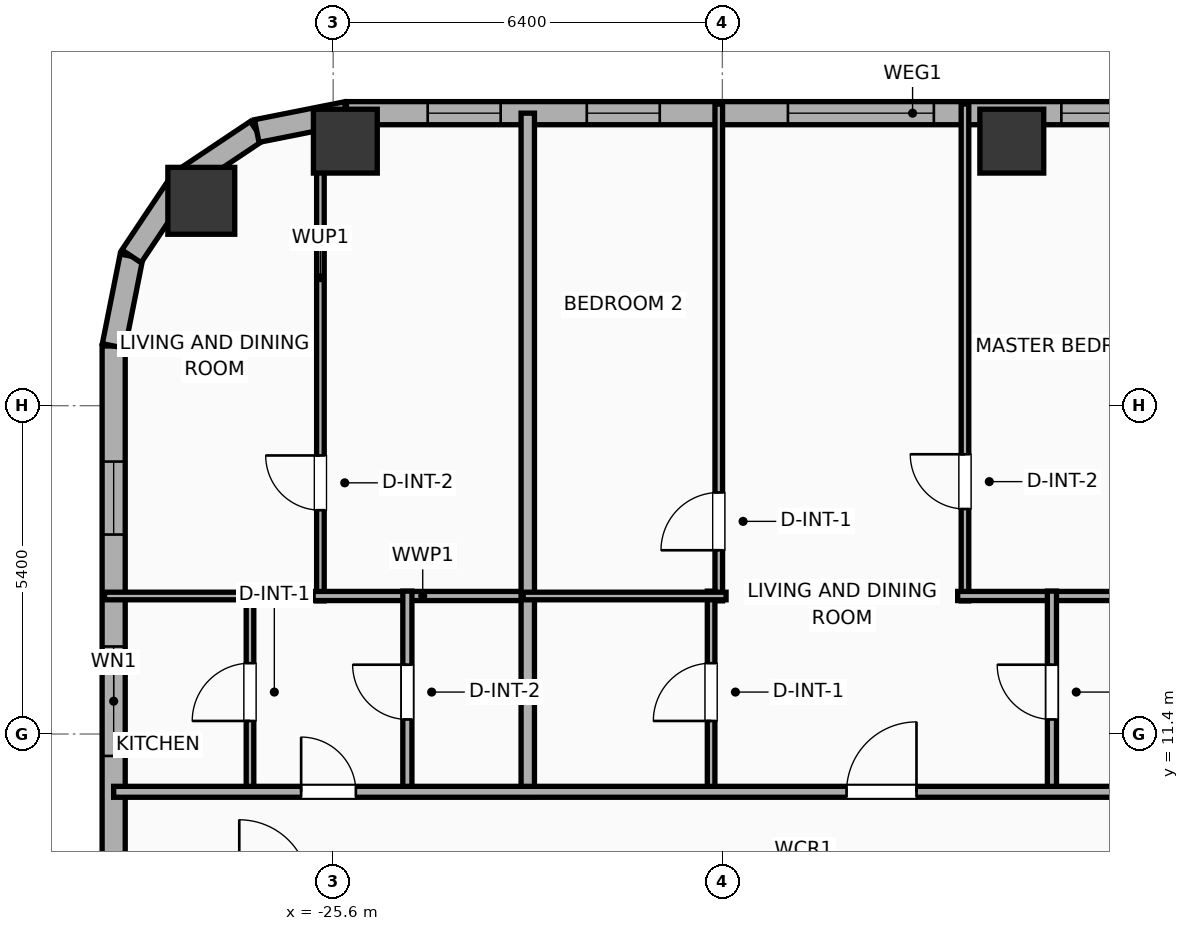
"""IFC4 building model, lengths in metres.
Left out: names, types, materials, properties, quantities, classifications, styles, units other than length and angle.
Written with IfcOpenShell. Run it as: python <this file> out.ifc"""

import sys

from ifc_helpers import new_model, si_unit, direction, frame, frame_2d, origin, origin_2d, place, context, subcontext, project, spatial, rectangle, hollow_rectangle, hollow_circle, extrude, element, fill, save


model = new_model("IFC4")
c1 = context("Model", 3, precision=1e-05, world=origin(), true_north=direction((0.0, 1.0)))
c2 = subcontext(c1, "Body", "Model", "MODEL_VIEW")
j1 = project(units=[si_unit("LENGTHUNIT", "METRE"), si_unit("PLANEANGLEUNIT", "RADIAN")], contexts=[c1])
p1 = place(None, origin())
s1 = spatial("IfcSite", under=j1, at=p1, CompositionType="ELEMENT")
p2 = place(p1, origin())
s2 = spatial("IfcBuilding", under=s1, at=p2, CompositionType="ELEMENT")
p3 = place(p2, frame((0.0, 0.0, 117.0)))
s3 = spatial("IfcBuildingStorey", under=s2, at=p3, CompositionType="ELEMENT", Elevation=117.0)
for number, where, z_axis, x_axis in (
    (1, (-14.44, 21.15, 0.0), (0.0, 0.0, 1.0), (1.0, 0.0, 0.0)),
    (2, (-25.4, 21.15, 0.0), (0.0, 0.0, 1.0), (1.0, 0.0, 0.0)),
):
    element("IfcColumn", number, at=place(p3, frame(where, z_axis=z_axis, x_axis=x_axis)), inside=s3, PredefinedType="COLUMN", context=c2, shape_type="SweptSolid", body=[
        extrude(hollow_rectangle(XDim=1.05, YDim=1.05, WallThickness=0.036, at=origin_2d()), origin(), (0.0, 0.0, 1.0), 3.9),
    ])
p4 = place(p3, frame((-27.769, 20.169, 0.0), z_axis=(0.0, 0.0, 1.0), x_axis=(1.0, 0.0, 0.0)))
e3 = element("IfcColumn", 3, at=p4, inside=s3, PredefinedType="COLUMN", context=c2, shape_type="SweptSolid", body=[
    extrude(hollow_circle(Radius=0.55, WallThickness=0.036, at=origin_2d()), origin(), (0.0, 0.0, 1.0), 3.9),
])
p5 = place(p3, frame((-29.21, 6.098, 0.0), z_axis=(0.0, 0.0, 1.0), x_axis=(0.0, 1.0, 0.0)))
e4 = element("IfcWall", 4, at=p5, inside=s3, PredefinedType="ELEMENTEDWALL", context=c2, shape_type="SweptSolid", body=[
    extrude(rectangle(XDim=11.683, YDim=0.38, at=frame_2d((5.842, 0.0))), origin(), (0.0, 0.0, 1.0), 3.65),
])
p6 = place(p5, frame((4.942, 0.0, 0.75)))
e5 = element("IfcOpeningElement", 5, at=p6, cuts=e4, PredefinedType="OPENING", context=c2, shape_type="SweptSolid", body=[
    extrude(rectangle(XDim=1.8, YDim=2.1, at=frame_2d((0.9, 1.05))), frame((0.0, 0.2, 0.0), z_axis=(0.0, -1.0, 0.0), x_axis=(1.0, 0.0, 0.0)), (0.0, 0.0, 1.0), 0.4),
])
p7 = place(p5, frame((8.583, 0.0, 0.75)))
e6 = element("IfcOpeningElement", 6, at=p7, cuts=e4, PredefinedType="OPENING", context=c2, shape_type="SweptSolid", body=[
    extrude(rectangle(XDim=1.2, YDim=2.05, at=frame_2d((0.6, 1.025))), frame((0.0, 0.2, 0.0), z_axis=(0.0, -1.0, 0.0), x_axis=(1.0, 0.0, 0.0)), (0.0, 0.0, 1.0), 0.4),
])
p8 = place(p3, frame((-29.21, 17.781, 0.0), z_axis=(0.0, 0.0, 1.0), x_axis=(0.195086038585, 0.980786132421, 0.0)))
e7 = element("IfcWall", 7, at=p8, inside=s3, PredefinedType="ELEMENTEDWALL", context=c2, shape_type="SweptSolid", body=[
    extrude(rectangle(XDim=1.504, YDim=0.38, at=frame_2d((0.752, 0.0))), origin(), (0.0, 0.0, 1.0), 3.65),
])
p9 = place(p3, frame((-28.917, 19.257, 0.0), z_axis=(0.0, 0.0, 1.0), x_axis=(0.555610286119, 0.831442848281, 0.0)))
e8 = element("IfcWall", 8, at=p9, inside=s3, PredefinedType="ELEMENTEDWALL", context=c2, shape_type="SweptSolid", body=[
    extrude(rectangle(XDim=1.485, YDim=0.38, at=frame_2d((0.743, 0.0))), origin(), (0.0, 0.0, 1.0), 3.65),
])
p10 = place(p3, frame((-28.091, 20.491, 0.0), z_axis=(0.0, 0.0, 1.0), x_axis=(0.831468045563, 0.555572577804, 0.0)))
e9 = element("IfcWall", 9, at=p10, inside=s3, PredefinedType="ELEMENTEDWALL", context=c2, shape_type="SweptSolid", body=[
    extrude(rectangle(XDim=1.485, YDim=0.38, at=frame_2d((0.742, 0.0))), origin(), (0.0, 0.0, 1.0), 3.65),
])
p11 = place(p3, frame((-26.857, 21.316, 0.0), z_axis=(0.0, 0.0, 1.0), x_axis=(0.980755066645, 0.195242155415, 0.0)))
e10 = element("IfcWall", 10, at=p11, inside=s3, PredefinedType="ELEMENTEDWALL", context=c2, shape_type="SweptSolid", body=[
    extrude(rectangle(XDim=1.504, YDim=0.38, at=frame_2d((0.752, 0.0))), origin(), (0.0, 0.0, 1.0), 3.65),
])
p12 = place(p3, frame((-25.381, 21.61, 0.0), z_axis=(0.0, 0.0, 1.0), x_axis=(1.0, 0.0, 0.0)))
e11 = element("IfcWall", 11, at=p12, inside=s3, PredefinedType="ELEMENTEDWALL", context=c2, shape_type="SweptSolid", body=[
    extrude(rectangle(XDim=18.619, YDim=0.38, at=frame_2d((9.31, 0.0))), origin(), (0.0, 0.0, 1.0), 3.65),
])
p13 = place(p12, frame((7.26, 0.0, 0.75)))
e12 = element("IfcOpeningElement", 12, at=p13, cuts=e11, PredefinedType="OPENING", context=c2, shape_type="SweptSolid", body=[
    extrude(rectangle(XDim=2.4, YDim=2.1, at=frame_2d((1.2, 1.05))), frame((0.0, 0.2, 0.0), z_axis=(0.0, -1.0, 0.0), x_axis=(1.0, 0.0, 0.0)), (0.0, 0.0, 1.0), 0.4),
])
p14 = place(p12, frame((1.336, 0.0, 0.75)))
e13 = element("IfcOpeningElement", 13, at=p14, cuts=e11, PredefinedType="OPENING", context=c2, shape_type="SweptSolid", body=[
    extrude(rectangle(XDim=1.2, YDim=2.05, at=frame_2d((0.6, 1.025))), frame((0.0, 0.2, 0.0), z_axis=(0.0, -1.0, 0.0), x_axis=(1.0, 0.0, 0.0)), (0.0, 0.0, 1.0), 0.4),
])
p15 = place(p12, frame((3.952, 0.0, 0.75)))
e14 = element("IfcOpeningElement", 14, at=p15, cuts=e11, PredefinedType="OPENING", context=c2, shape_type="SweptSolid", body=[
    extrude(rectangle(XDim=1.2, YDim=2.05, at=frame_2d((0.6, 1.025))), frame((0.0, 0.2, 0.0), z_axis=(0.0, -1.0, 0.0), x_axis=(1.0, 0.0, 0.0)), (0.0, 0.0, 1.0), 0.4),
])
p16 = place(p12, frame((11.756, 0.0, 0.75)))
e15 = element("IfcOpeningElement", 15, at=p16, cuts=e11, PredefinedType="OPENING", context=c2, shape_type="SweptSolid", body=[
    extrude(rectangle(XDim=1.2, YDim=2.05, at=frame_2d((0.6, 1.025))), frame((0.0, 0.2, 0.0), z_axis=(0.0, -1.0, 0.0), x_axis=(1.0, 0.0, 0.0)), (0.0, 0.0, 1.0), 0.4),
])
p17 = place(p12, frame((14.363, 0.0, 0.75)))
e16 = element("IfcOpeningElement", 16, at=p17, cuts=e11, PredefinedType="OPENING", context=c2, shape_type="SweptSolid", body=[
    extrude(rectangle(XDim=1.2, YDim=2.05, at=frame_2d((0.6, 1.025))), frame((0.0, 0.2, 0.0), z_axis=(0.0, -1.0, 0.0), x_axis=(1.0, 0.0, 0.0)), (0.0, 0.0, 1.0), 0.4),
])
p18 = place(p3, frame((-25.81, 13.59, 0.0), z_axis=(0.0, 0.0, 1.0), x_axis=(0.0, 1.0, 0.0)))
e17 = element("IfcWall", 17, at=p18, inside=s3, PredefinedType="PARTITIONING", context=c2, shape_type="SweptSolid", body=[
    extrude(rectangle(XDim=8.088, YDim=0.125, at=frame_2d((4.044, 0.0))), origin(), (0.0, 0.0, 1.0), 3.65),
])
p19 = place(p18, frame((1.491, 0.0, 0.0)))
e18 = element("IfcOpeningElement", 18, at=p19, cuts=e17, PredefinedType="OPENING", context=c2, shape_type="SweptSolid", body=[
    extrude(rectangle(XDim=0.9, YDim=2.05, at=frame_2d((0.45, 1.025))), frame((0.0, 0.073, 0.0), z_axis=(0.0, -1.0, 0.0), x_axis=(1.0, 0.0, 0.0)), (0.0, 0.0, 1.0), 0.145),
])
p20 = place(p3, frame((-25.93, 13.67, 0.0), z_axis=(0.0, 0.0, 1.0), x_axis=(1.0, 0.0, 0.0)))
e19 = element("IfcWall", 19, at=p20, inside=s3, PredefinedType="PLUMBINGWALL", context=c2, shape_type="SweptSolid", body=[
    extrude(rectangle(XDim=3.605, YDim=0.15, at=frame_2d((1.802, 0.0))), origin(), (0.0, 0.0, 1.0), 3.65),
])
p21 = place(p3, frame((-26.968, 10.43, 0.0), z_axis=(0.0, 0.0, 1.0), x_axis=(0.0, 1.0, 0.0)))
e20 = element("IfcWall", 20, at=p21, inside=s3, PredefinedType="PARTITIONING", context=c2, shape_type="SweptSolid", body=[
    extrude(rectangle(XDim=3.32, YDim=0.125, at=frame_2d((1.66, 0.0))), origin(), (0.0, 0.0, 1.0), 3.65),
])
p22 = place(p21, frame((1.185, 0.0, 0.0)))
e21 = element("IfcOpeningElement", 21, at=p22, cuts=e20, PredefinedType="OPENING", context=c2, shape_type="SweptSolid", body=[
    extrude(rectangle(XDim=0.95, YDim=2.05, at=frame_2d((0.475, 1.025))), frame((0.0, 0.073, 0.0), z_axis=(0.0, -1.0, 0.0), x_axis=(1.0, 0.0, 0.0)), (0.0, 0.0, 1.0), 0.145),
])
p23 = place(p3, frame((-29.36, 13.67, 0.0), z_axis=(0.0, 0.0, 1.0), x_axis=(1.0, 0.0, 0.0)))
e22 = element("IfcWall", 22, at=p23, inside=s3, PredefinedType="PARTITIONING", context=c2, shape_type="SweptSolid", body=[
    extrude(rectangle(XDim=2.512, YDim=0.125, at=frame_2d((1.256, 0.0))), origin(), (0.0, 0.0, 1.0), 3.65),
])
p24 = place(p3, frame((-24.38, 10.43, 0.0), z_axis=(0.0, 0.0, 1.0), x_axis=(0.0, 1.0, 0.0)))
e23 = element("IfcWall", 23, at=p24, inside=s3, PredefinedType="PLUMBINGWALL", context=c2, shape_type="SweptSolid", body=[
    extrude(rectangle(XDim=3.32, YDim=0.15, at=frame_2d((1.66, 0.0))), origin(), (0.0, 0.0, 1.0), 3.65),
])
p25 = place(p24, frame((1.21, 0.0, 0.0)))
e24 = element("IfcOpeningElement", 24, at=p25, cuts=e23, PredefinedType="OPENING", context=c2, shape_type="SweptSolid", body=[
    extrude(rectangle(XDim=0.9, YDim=2.05, at=frame_2d((0.45, 1.025))), frame((0.0, 0.085, 0.0), z_axis=(0.0, -1.0, 0.0), x_axis=(1.0, 0.0, 0.0)), (0.0, 0.0, 1.0), 0.17),
])
p26 = place(p3, frame((-22.4, 10.37, 0.0), z_axis=(0.0, 0.0, 1.0), x_axis=(0.0, 1.0, 0.0)))
e25 = element("IfcWall", 25, at=p26, inside=s3, PredefinedType="PARTITIONING", context=c2, shape_type="SweptSolid", body=[
    extrude(rectangle(XDim=11.24, YDim=0.22, at=frame_2d((5.62, 0.0))), origin(), (0.0, 0.0, 1.0), 3.65),
])
p27 = place(p3, frame((-19.259, 13.59, 0.0), z_axis=(0.0, 0.0, 1.0), x_axis=(0.0, 1.0, 0.0)))
e26 = element("IfcWall", 26, at=p27, inside=s3, PredefinedType="PARTITIONING", context=c2, shape_type="SweptSolid", body=[
    extrude(rectangle(XDim=8.17, YDim=0.125, at=frame_2d((4.085, 0.0))), origin(), (0.0, 0.0, 1.0), 3.65),
])
p28 = place(p27, frame((0.832, 0.0, 0.0)))
e27 = element("IfcOpeningElement", 27, at=p28, cuts=e26, PredefinedType="OPENING", context=c2, shape_type="SweptSolid", body=[
    extrude(rectangle(XDim=0.95, YDim=2.05, at=frame_2d((0.475, 1.025))), frame((0.0, 0.073, 0.0), z_axis=(0.0, -1.0, 0.0), x_axis=(1.0, 0.0, 0.0)), (0.0, 0.0, 1.0), 0.145),
])
p29 = place(p3, frame((-15.21, 13.59, 0.0), z_axis=(0.0, 0.0, 1.0), x_axis=(0.0, 1.0, 0.0)))
e28 = element("IfcWall", 28, at=p29, inside=s3, PredefinedType="PARTITIONING", context=c2, shape_type="SweptSolid", body=[
    extrude(rectangle(XDim=8.17, YDim=0.125, at=frame_2d((4.085, 0.0))), origin(), (0.0, 0.0, 1.0), 3.04),
])
p30 = place(p29, frame((1.511, 0.0, 0.0)))
e29 = element("IfcOpeningElement", 29, at=p30, cuts=e28, PredefinedType="OPENING", context=c2, shape_type="SweptSolid", body=[
    extrude(rectangle(XDim=0.9, YDim=2.05, at=frame_2d((0.45, 1.025))), frame((0.0, 0.073, 0.0), z_axis=(0.0, -1.0, 0.0), x_axis=(1.0, 0.0, 0.0)), (0.0, 0.0, 1.0), 0.145),
])
p31 = place(p3, frame((-15.33, 13.67, 0.0), z_axis=(0.0, 0.0, 1.0), x_axis=(1.0, 0.0, 0.0)))
e30 = element("IfcWall", 30, at=p31, inside=s3, PredefinedType="PLUMBINGWALL", context=c2, shape_type="SweptSolid", body=[
    extrude(rectangle(XDim=3.605, YDim=0.15, at=frame_2d((1.802, 0.0))), origin(), (0.0, 0.0, 1.0), 3.65),
])
p32 = place(p3, frame((-19.385, 10.43, 0.0), z_axis=(0.0, 0.0, 1.0), x_axis=(0.0, 1.0, 0.0)))
e31 = element("IfcWall", 31, at=p32, inside=s3, PredefinedType="PARTITIONING", context=c2, shape_type="SweptSolid", body=[
    extrude(rectangle(XDim=3.32, YDim=0.125, at=frame_2d((1.66, 0.0))), origin(), (0.0, 0.0, 1.0), 3.65),
])
p33 = place(p32, frame((1.185, 0.0, 0.0)))
e32 = element("IfcOpeningElement", 32, at=p33, cuts=e31, PredefinedType="OPENING", context=c2, shape_type="SweptSolid", body=[
    extrude(rectangle(XDim=0.95, YDim=2.05, at=frame_2d((0.475, 1.025))), frame((0.0, 0.073, 0.0), z_axis=(0.0, -1.0, 0.0), x_axis=(1.0, 0.0, 0.0)), (0.0, 0.0, 1.0), 0.145),
])
p34 = place(p3, frame((-22.475, 13.67, 0.0), z_axis=(0.0, 0.0, 1.0), x_axis=(1.0, 0.0, 0.0)))
e33 = element("IfcWall", 33, at=p34, inside=s3, PredefinedType="PARTITIONING", context=c2, shape_type="SweptSolid", body=[
    extrude(rectangle(XDim=3.336, YDim=0.125, at=frame_2d((1.668, 0.0))), origin(), (0.0, 0.0, 1.0), 3.65),
])
p35 = place(p3, frame((-13.78, 10.43, 0.0), z_axis=(0.0, 0.0, 1.0), x_axis=(0.0, 1.0, 0.0)))
e34 = element("IfcWall", 34, at=p35, inside=s3, PredefinedType="PLUMBINGWALL", context=c2, shape_type="SweptSolid", body=[
    extrude(rectangle(XDim=3.32, YDim=0.15, at=frame_2d((1.66, 0.0))), origin(), (0.0, 0.0, 1.0), 3.65),
])
p36 = place(p35, frame((1.21, 0.0, 0.0)))
e35 = element("IfcOpeningElement", 35, at=p36, cuts=e34, PredefinedType="OPENING", context=c2, shape_type="SweptSolid", body=[
    extrude(rectangle(XDim=0.9, YDim=2.05, at=frame_2d((0.45, 1.025))), frame((0.0, 0.085, 0.0), z_axis=(0.0, -1.0, 0.0), x_axis=(1.0, 0.0, 0.0)), (0.0, 0.0, 1.0), 0.17),
])
p37 = place(p3, frame((-29.21, 10.45, 0.0), z_axis=(0.0, 0.0, 1.0), x_axis=(1.0, 0.0, 0.0)))
e36 = element("IfcWall", 36, at=p37, inside=s3, PredefinedType="PARTITIONING", context=c2, shape_type="SweptSolid", body=[
    extrude(rectangle(XDim=62.42, YDim=0.18, at=frame_2d((31.21, 0.0))), origin(), (0.0, 0.0, 1.0), 3.65),
])
p38 = place(p37, frame((3.083, 0.0, 0.0)))
e37 = element("IfcOpeningElement", 37, at=p38, cuts=e36, PredefinedType="OPENING", context=c2, shape_type="SweptSolid", body=[
    extrude(rectangle(XDim=0.9, YDim=2.05, at=frame_2d((0.45, 1.025))), frame((0.0, 0.1, 0.0), z_axis=(0.0, -1.0, 0.0), x_axis=(1.0, 0.0, 0.0)), (0.0, 0.0, 1.0), 0.2),
])
p39 = place(p37, frame((12.052, 0.0, 0.0)))
e38 = element("IfcOpeningElement", 38, at=p39, cuts=e36, PredefinedType="OPENING", context=c2, shape_type="SweptSolid", body=[
    extrude(rectangle(XDim=1.15, YDim=2.05, at=frame_2d((0.575, 1.025))), frame((0.0, 0.1, 0.0), z_axis=(0.0, -1.0, 0.0), x_axis=(1.0, 0.0, 0.0)), (0.0, 0.0, 1.0), 0.2),
])
p40 = place(p37, frame((22.558, 0.0, 0.0)))
e39 = element("IfcOpeningElement", 39, at=p40, cuts=e36, PredefinedType="OPENING", context=c2, shape_type="SweptSolid", body=[
    extrude(rectangle(XDim=1.15, YDim=2.05, at=frame_2d((0.575, 1.025))), frame((0.0, 0.1, 0.0), z_axis=(0.0, -1.0, 0.0), x_axis=(1.0, 0.0, 0.0)), (0.0, 0.0, 1.0), 0.2),
])
p41 = place(p37, frame((33.219, 0.0, 0.0)))
e40 = element("IfcOpeningElement", 40, at=p41, cuts=e36, PredefinedType="OPENING", context=c2, shape_type="SweptSolid", body=[
    extrude(rectangle(XDim=1.15, YDim=2.05, at=frame_2d((0.575, 1.025))), frame((0.0, 0.1, 0.0), z_axis=(0.0, -1.0, 0.0), x_axis=(1.0, 0.0, 0.0)), (0.0, 0.0, 1.0), 0.2),
])
p42 = place(p37, frame((43.725, 0.0, 0.0)))
e41 = element("IfcOpeningElement", 41, at=p42, cuts=e36, PredefinedType="OPENING", context=c2, shape_type="SweptSolid", body=[
    extrude(rectangle(XDim=1.15, YDim=2.05, at=frame_2d((0.575, 1.025))), frame((0.0, 0.1, 0.0), z_axis=(0.0, -1.0, 0.0), x_axis=(1.0, 0.0, 0.0)), (0.0, 0.0, 1.0), 0.2),
])
p43 = place(p37, frame((52.232, 0.0, 0.0)))
e42 = element("IfcOpeningElement", 42, at=p43, cuts=e36, PredefinedType="OPENING", context=c2, shape_type="SweptSolid", body=[
    extrude(rectangle(XDim=0.9, YDim=2.05, at=frame_2d((0.45, 1.025))), frame((0.0, 0.1, 0.0), z_axis=(0.0, -1.0, 0.0), x_axis=(1.0, 0.0, 0.0)), (0.0, 0.0, 1.0), 0.2),
])
p44 = place(p37, frame((58.868, 0.0, 0.0)))
e43 = element("IfcOpeningElement", 43, at=p44, cuts=e36, PredefinedType="OPENING", context=c2, shape_type="SweptSolid", body=[
    extrude(rectangle(XDim=0.9, YDim=2.05, at=frame_2d((0.45, 1.025))), frame((0.0, 0.1, 0.0), z_axis=(0.0, -1.0, 0.0), x_axis=(1.0, 0.0, 0.0)), (0.0, 0.0, 1.0), 0.2),
])
p45 = place(p6, origin())
e44 = element("IfcWindow", 44, at=p45, inside=s3, PartitioningType="SINGLE_PANEL", PredefinedType="WINDOW", context=c2, shape_type="SweptSolid", body=[
    extrude(rectangle(XDim=1.8, YDim=2.1, at=frame_2d((0.9, 1.05))), frame((0.0, 0.03, 0.0), z_axis=(0.0, -1.0, 0.0), x_axis=(1.0, 0.0, 0.0)), (0.0, 0.0, 1.0), 0.06),
])
fill(e5, e44)
p46 = place(p13, origin())
e45 = element("IfcWindow", 45, at=p46, inside=s3, PartitioningType="SINGLE_PANEL", PredefinedType="WINDOW", context=c2, shape_type="SweptSolid", body=[
    extrude(rectangle(XDim=2.4, YDim=2.1, at=frame_2d((1.2, 1.05))), frame((0.0, 0.03, 0.0), z_axis=(0.0, -1.0, 0.0), x_axis=(1.0, 0.0, 0.0)), (0.0, 0.0, 1.0), 0.06),
])
fill(e12, e45)
p47 = place(p7, origin())
e46 = element("IfcWindow", 46, at=p47, inside=s3, PartitioningType="SINGLE_PANEL", PredefinedType="WINDOW", context=c2, shape_type="SweptSolid", body=[
    extrude(rectangle(XDim=1.2, YDim=2.05, at=frame_2d((0.6, 1.025))), frame((0.0, 0.03, 0.0), z_axis=(0.0, -1.0, 0.0), x_axis=(1.0, 0.0, 0.0)), (0.0, 0.0, 1.0), 0.06),
])
fill(e6, e46)
p48 = place(p14, origin())
e47 = element("IfcWindow", 47, at=p48, inside=s3, PartitioningType="SINGLE_PANEL", PredefinedType="WINDOW", context=c2, shape_type="SweptSolid", body=[
    extrude(rectangle(XDim=1.2, YDim=2.05, at=frame_2d((0.6, 1.025))), frame((0.0, 0.03, 0.0), z_axis=(0.0, -1.0, 0.0), x_axis=(1.0, 0.0, 0.0)), (0.0, 0.0, 1.0), 0.06),
])
fill(e13, e47)
p49 = place(p15, origin())
e48 = element("IfcWindow", 48, at=p49, inside=s3, PartitioningType="SINGLE_PANEL", PredefinedType="WINDOW", context=c2, shape_type="SweptSolid", body=[
    extrude(rectangle(XDim=1.2, YDim=2.05, at=frame_2d((0.6, 1.025))), frame((0.0, 0.03, 0.0), z_axis=(0.0, -1.0, 0.0), x_axis=(1.0, 0.0, 0.0)), (0.0, 0.0, 1.0), 0.06),
])
fill(e14, e48)
p50 = place(p16, origin())
e49 = element("IfcWindow", 49, at=p50, inside=s3, PartitioningType="SINGLE_PANEL", PredefinedType="WINDOW", context=c2, shape_type="SweptSolid", body=[
    extrude(rectangle(XDim=1.2, YDim=2.05, at=frame_2d((0.6, 1.025))), frame((0.0, 0.03, 0.0), z_axis=(0.0, -1.0, 0.0), x_axis=(1.0, 0.0, 0.0)), (0.0, 0.0, 1.0), 0.06),
])
fill(e15, e49)
p51 = place(p19, origin())
e50 = element("IfcDoor", 50, at=p51, inside=s3, OperationType="SINGLE_SWING_RIGHT", PredefinedType="DOOR", context=c2, shape_type="SweptSolid", body=[
    extrude(rectangle(XDim=0.9, YDim=2.05, at=frame_2d((0.45, 1.025))), frame((0.0, 0.025, 0.0), z_axis=(0.0, -1.0, 0.0), x_axis=(1.0, 0.0, 0.0)), (0.0, 0.0, 1.0), 0.05),
])
fill(e18, e50)
p52 = place(p22, origin())
e51 = element("IfcDoor", 51, at=p52, inside=s3, OperationType="SINGLE_SWING_LEFT", PredefinedType="DOOR", context=c2, shape_type="SweptSolid", body=[
    extrude(rectangle(XDim=0.95, YDim=2.05, at=frame_2d((0.475, 1.025))), frame((0.0, 0.025, 0.0), z_axis=(0.0, -1.0, 0.0), x_axis=(1.0, 0.0, 0.0)), (0.0, 0.0, 1.0), 0.05),
])
fill(e21, e51)
p53 = place(p25, origin())
e52 = element("IfcDoor", 52, at=p53, inside=s3, OperationType="SINGLE_SWING_RIGHT", PredefinedType="DOOR", context=c2, shape_type="SweptSolid", body=[
    extrude(rectangle(XDim=0.9, YDim=2.05, at=frame_2d((0.45, 1.025))), frame((0.0, 0.025, 0.0), z_axis=(0.0, -1.0, 0.0), x_axis=(1.0, 0.0, 0.0)), (0.0, 0.0, 1.0), 0.05),
])
fill(e24, e52)
p54 = place(p28, origin())
e53 = element("IfcDoor", 53, at=p54, inside=s3, OperationType="SINGLE_SWING_LEFT", PredefinedType="DOOR", context=c2, shape_type="SweptSolid", body=[
    extrude(rectangle(XDim=0.95, YDim=2.05, at=frame_2d((0.475, 1.025))), frame((0.0, 0.025, 0.0), z_axis=(0.0, -1.0, 0.0), x_axis=(1.0, 0.0, 0.0)), (0.0, 0.0, 1.0), 0.05),
])
fill(e27, e53)
p55 = place(p30, origin())
e54 = element("IfcDoor", 54, at=p55, inside=s3, OperationType="SINGLE_SWING_RIGHT", PredefinedType="DOOR", context=c2, shape_type="SweptSolid", body=[
    extrude(rectangle(XDim=0.9, YDim=2.05, at=frame_2d((0.45, 1.025))), frame((0.0, 0.025, 0.0), z_axis=(0.0, -1.0, 0.0), x_axis=(1.0, 0.0, 0.0)), (0.0, 0.0, 1.0), 0.05),
])
fill(e29, e54)
p56 = place(p33, origin())
e55 = element("IfcDoor", 55, at=p56, inside=s3, OperationType="SINGLE_SWING_LEFT", PredefinedType="DOOR", context=c2, shape_type="SweptSolid", body=[
    extrude(rectangle(XDim=0.95, YDim=2.05, at=frame_2d((0.475, 1.025))), frame((0.0, 0.025, 0.0), z_axis=(0.0, -1.0, 0.0), x_axis=(1.0, 0.0, 0.0)), (0.0, 0.0, 1.0), 0.05),
])
fill(e32, e55)
p57 = place(p36, origin())
e56 = element("IfcDoor", 56, at=p57, inside=s3, OperationType="SINGLE_SWING_RIGHT", PredefinedType="DOOR", context=c2, shape_type="SweptSolid", body=[
    extrude(rectangle(XDim=0.9, YDim=2.05, at=frame_2d((0.45, 1.025))), frame((0.0, 0.025, 0.0), z_axis=(0.0, -1.0, 0.0), x_axis=(1.0, 0.0, 0.0)), (0.0, 0.0, 1.0), 0.05),
])
fill(e35, e56)
p58 = place(p38, origin())
e57 = element("IfcDoor", 57, at=p58, inside=s3, OperationType="SINGLE_SWING_LEFT", PredefinedType="DOOR", context=c2, shape_type="SweptSolid", body=[
    extrude(rectangle(XDim=0.9, YDim=2.05, at=frame_2d((0.45, 1.025))), frame((0.0, 0.025, 0.0), z_axis=(0.0, -1.0, 0.0), x_axis=(1.0, 0.0, 0.0)), (0.0, 0.0, 1.0), 0.05),
])
fill(e37, e57)
p59 = place(p39, origin())
e58 = element("IfcDoor", 58, at=p59, inside=s3, OperationType="SINGLE_SWING_RIGHT", PredefinedType="DOOR", context=c2, shape_type="SweptSolid", body=[
    extrude(rectangle(XDim=1.15, YDim=2.05, at=frame_2d((0.575, 1.025))), frame((0.0, 0.025, 0.0), z_axis=(0.0, -1.0, 0.0), x_axis=(1.0, 0.0, 0.0)), (0.0, 0.0, 1.0), 0.05),
])
fill(e38, e58)
save(model, sys.argv[1])
